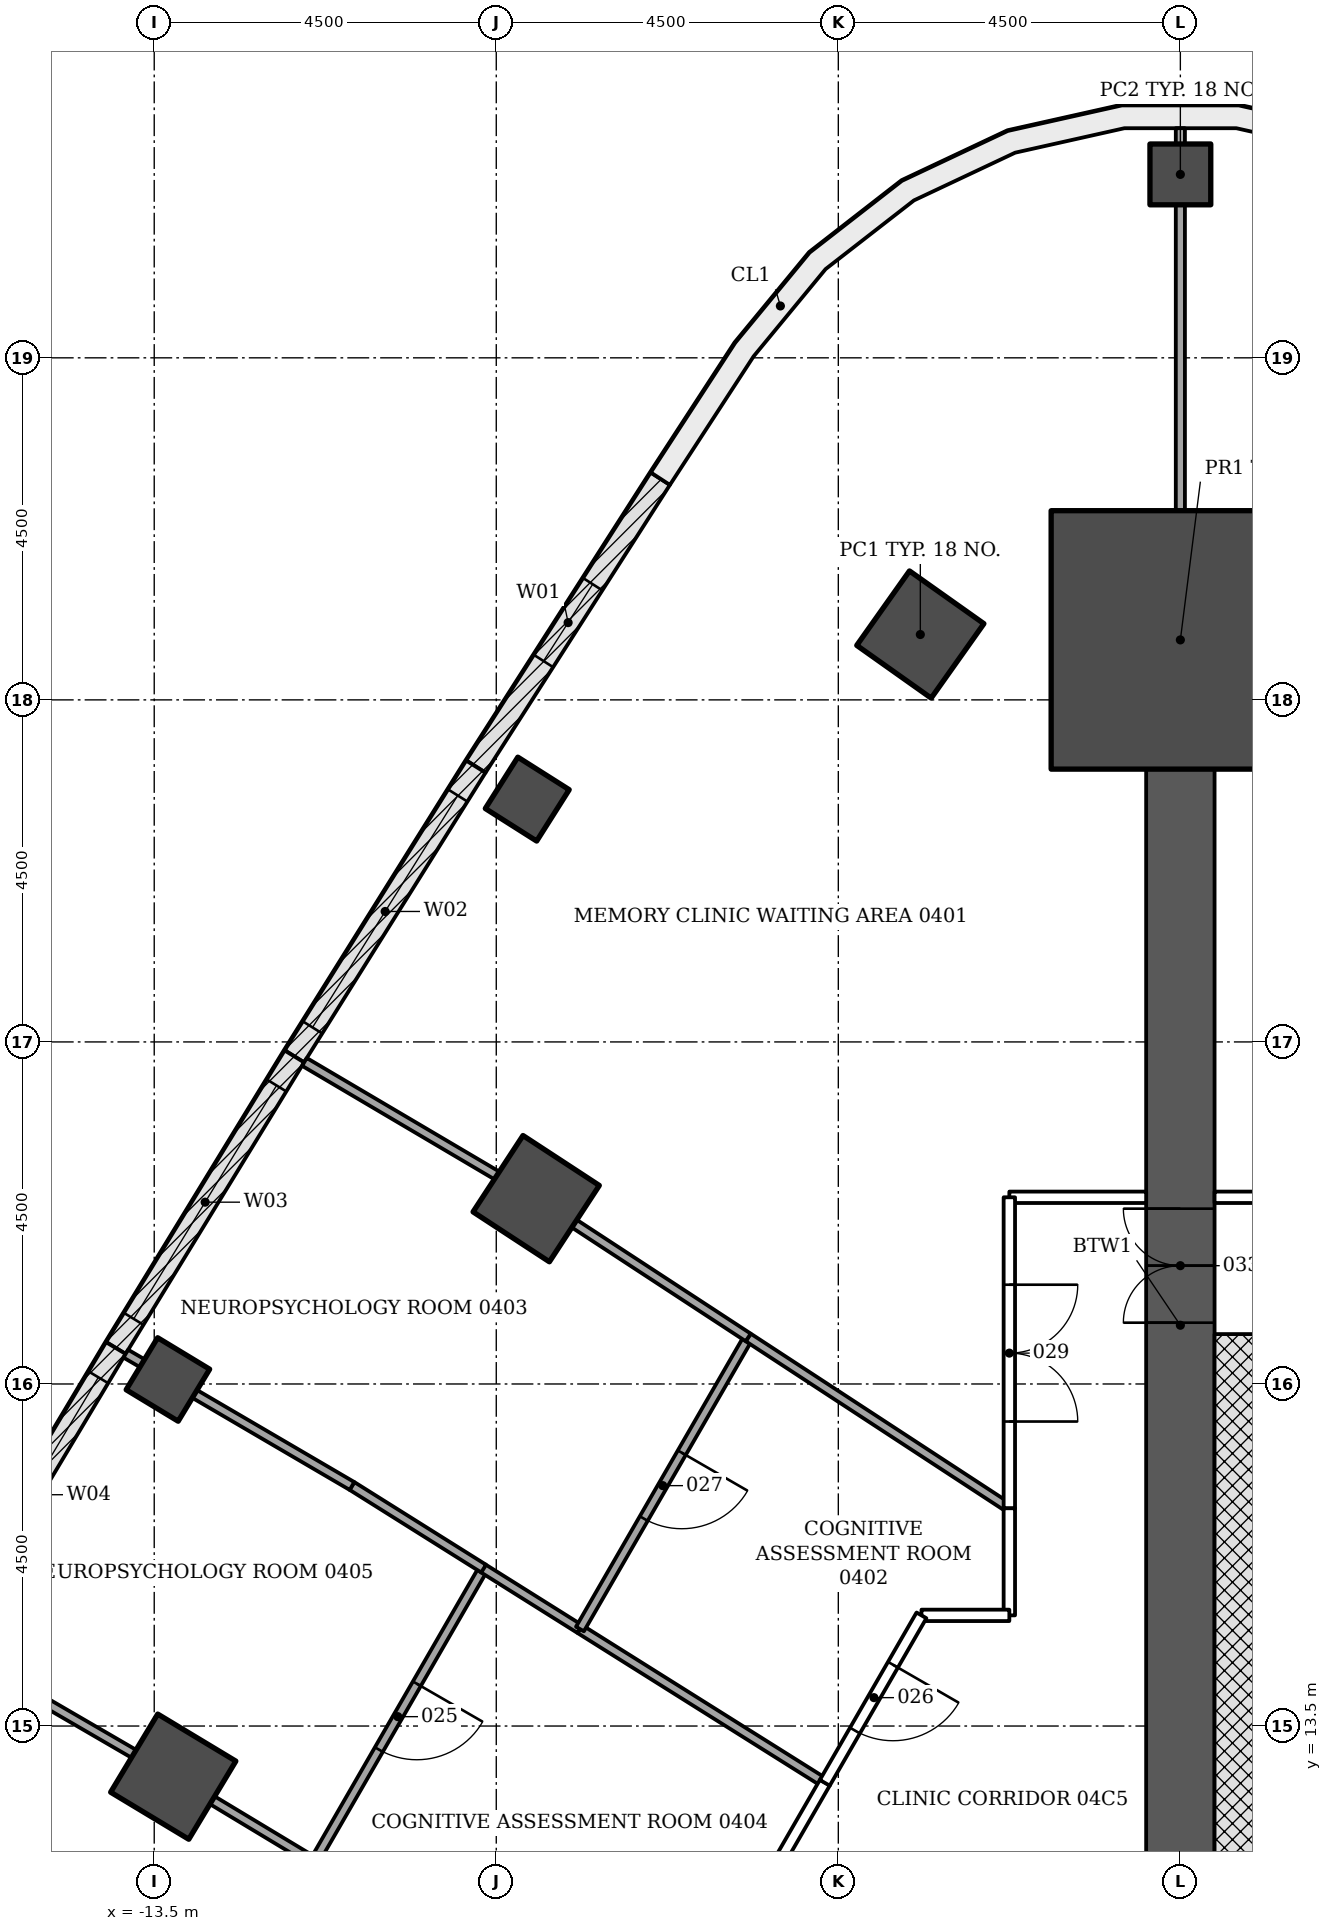
"""IFC4 building model, lengths in metres.
Left out: names, types, materials, properties, quantities, classifications, styles, units other than length and angle.
Written with IfcOpenShell. Run it as: python <this file> out.ifc"""

import sys

from ifc_helpers import new_model, si_unit, direction, frame, frame_2d, origin, origin_2d, place, context, subcontext, project, spatial, polyline, rectangle, outline, extrude, element, fill, save


model = new_model("IFC4")
c1 = context("Model", 3, precision=1e-05, world=origin(), true_north=direction((0.0, 1.0)))
c2 = subcontext(c1, "Body", "Model", "MODEL_VIEW")
j1 = project(units=[si_unit("LENGTHUNIT", "METRE"), si_unit("PLANEANGLEUNIT", "RADIAN")], contexts=[c1])
p1 = place(None, origin())
s1 = spatial("IfcSite", under=j1, at=p1, CompositionType="ELEMENT")
p2 = place(p1, origin())
s2 = spatial("IfcBuilding", under=s1, at=p2, CompositionType="ELEMENT")
p3 = place(p2, frame((0.0, 0.0, 19.5)))
s3 = spatial("IfcBuildingStorey", under=s2, at=p3, CompositionType="ELEMENT", Elevation=19.5)
for number, where, z_axis, x_axis in (
    (1, (-3.421, 27.86, -0.25), (0.0, 0.0, 1.0), (-0.816, 0.578, 0.0)),
    (2, (-8.475, 20.438, -0.25), (0.0, 0.0, 1.0), (-0.837, 0.547, 0.0)),
    (3, (-13.25, 12.834, -0.25), (0.0, 0.0, 1.0), (-0.857, 0.516, 0.0)),
):
    element("IfcColumn", number, at=place(p3, frame(where, z_axis=z_axis, x_axis=x_axis)), inside=s3, PredefinedType="COLUMN", context=c2, shape_type="SweptSolid", body=[
        extrude(rectangle(XDim=1.2, YDim=1.2, at=origin_2d()), origin(), (0.0, 0.0, 1.0), 4.55),
    ])
for number, where, z_axis, x_axis in (
    (4, (0.0, 33.913, -0.25), (0.0, 0.0, 1.0), (0.0, 1.0, 0.0)),
    (5, (-8.592, 25.695, -0.25), (0.0, 0.0, 1.0), (-0.845, 0.535, 0.0)),
    (6, (-13.32, 18.059, -0.25), (0.0, 0.0, 1.0), (-0.856, 0.518, 0.0)),
):
    element("IfcColumn", number, at=place(p3, frame(where, z_axis=z_axis, x_axis=x_axis)), inside=s3, PredefinedType="COLUMN", context=c2, shape_type="SweptSolid", body=[
        extrude(rectangle(XDim=0.8, YDim=0.8, at=origin_2d()), origin(), (0.0, 0.0, 1.0), 4.55),
    ])
p4 = place(p3, frame((0.0, 11.456, -0.25), z_axis=(0.0, 0.0, 1.0), x_axis=(0.0, 1.0, 0.0)))
e7 = element("IfcWall", 7, at=p4, inside=s3, PredefinedType="SHEAR", context=c2, shape_type="SweptSolid", body=[
    extrude(rectangle(XDim=14.633, YDim=0.9, at=frame_2d((7.316, 0.0))), origin(), (0.0, 0.0, 1.0), 4.55),
])
p5 = place(p4, frame((7.35, 0.0, 0.25)))
e8 = element("IfcOpeningElement", 8, at=p5, cuts=e7, PredefinedType="OPENING", context=c2, shape_type="SweptSolid", body=[
    extrude(rectangle(XDim=1.5, YDim=2.1, at=frame_2d((0.75, 1.05))), frame((0.0, 0.46, 0.0), z_axis=(0.0, -1.0, 0.0), x_axis=(1.0, 0.0, 0.0)), (0.0, 0.0, 1.0), 0.92),
])
p6 = place(p3, frame((0.0, 27.789, -0.25), z_axis=(0.0, 0.0, 1.0), x_axis=(0.0, 1.0, 0.0)))
e9 = element("IfcColumn", 9, at=p6, inside=s3, PredefinedType="COLUMN", context=c2, shape_type="SweptSolid", body=[
    extrude(rectangle(XDim=3.4, YDim=3.4, at=origin_2d()), origin(), (0.0, 0.0, 1.0), 4.55),
])
p7 = place(p3, frame((-9.268, 26.124, 0.0), z_axis=(0.0, 0.0, 1.0), x_axis=(0.539483537275, 0.841996147859, 0.0)))
e10 = element("IfcWall", 10, at=p7, inside=s3, PredefinedType="NOTDEFINED", context=c2, shape_type="SweptSolid", body=[
    extrude(rectangle(XDim=4.496, YDim=0.3, at=frame_2d((2.248, 0.0))), origin(), (0.0, 0.0, 1.0), 4.3),
])
p8 = place(p7, frame((1.648, 0.0, 0.8)))
e11 = element("IfcOpeningElement", 11, at=p8, cuts=e10, PredefinedType="OPENING", context=c2, shape_type="SweptSolid", body=[
    extrude(rectangle(XDim=1.2, YDim=3.0, at=frame_2d((0.6, 1.5))), frame((0.0, 0.16, 0.0), z_axis=(0.0, -1.0, 0.0), x_axis=(1.0, 0.0, 0.0)), (0.0, 0.0, 1.0), 0.32),
])
p9 = place(p3, frame((-11.655, 22.311, 0.0), z_axis=(0.0, 0.0, 1.0), x_axis=(0.530804082031, 0.847494558389, 0.0)))
e12 = element("IfcWall", 12, at=p9, inside=s3, PredefinedType="NOTDEFINED", context=c2, shape_type="SweptSolid", body=[
    extrude(rectangle(XDim=4.496, YDim=0.3, at=frame_2d((2.248, 0.0))), origin(), (0.0, 0.0, 1.0), 4.3),
])
p10 = place(p9, frame((0.448, 0.0, 1.5)))
e13 = element("IfcOpeningElement", 13, at=p10, cuts=e12, PredefinedType="OPENING", context=c2, shape_type="SweptSolid", body=[
    extrude(rectangle(XDim=3.6, YDim=1.8, at=frame_2d((1.8, 0.9))), frame((0.0, 0.16, 0.0), z_axis=(0.0, -1.0, 0.0), x_axis=(1.0, 0.0, 0.0)), (0.0, 0.0, 1.0), 0.32),
])
p11 = place(p3, frame((-14.004, 18.475, 0.0), z_axis=(0.0, 0.0, 1.0), x_axis=(0.522078085402, 0.852897691838, 0.0)))
e14 = element("IfcWall", 14, at=p11, inside=s3, PredefinedType="NOTDEFINED", context=c2, shape_type="SweptSolid", body=[
    extrude(rectangle(XDim=4.496, YDim=0.3, at=frame_2d((2.248, 0.0))), origin(), (0.0, 0.0, 1.0), 4.3),
])
p12 = place(p11, frame((0.448, 0.0, 1.5)))
e15 = element("IfcOpeningElement", 15, at=p12, cuts=e14, PredefinedType="OPENING", context=c2, shape_type="SweptSolid", body=[
    extrude(rectangle(XDim=3.6, YDim=1.8, at=frame_2d((1.8, 0.9))), frame((0.0, 0.16, 0.0), z_axis=(0.0, -1.0, 0.0), x_axis=(1.0, 0.0, 0.0)), (0.0, 0.0, 1.0), 0.32),
])
p13 = place(p3, frame((-16.313, 14.614, 0.0), z_axis=(0.0, 0.0, 1.0), x_axis=(0.513257465408, 0.858234684805, 0.0)))
e16 = element("IfcWall", 16, at=p13, inside=s3, PredefinedType="NOTDEFINED", context=c2, shape_type="SweptSolid", body=[
    extrude(rectangle(XDim=4.496, YDim=0.3, at=frame_2d((2.248, 0.0))), origin(), (0.0, 0.0, 1.0), 4.3),
])
p14 = place(p13, frame((0.448, 0.0, 1.5)))
e17 = element("IfcOpeningElement", 17, at=p14, cuts=e16, PredefinedType="OPENING", context=c2, shape_type="SweptSolid", body=[
    extrude(rectangle(XDim=3.6, YDim=1.8, at=frame_2d((1.8, 0.9))), frame((0.0, 0.16, 0.0), z_axis=(0.0, -1.0, 0.0), x_axis=(1.0, 0.0, 0.0)), (0.0, 0.0, 1.0), 0.32),
])
p15 = place(p3, origin())
e18 = element("IfcWall", 18, at=p15, inside=s3, PredefinedType="NOTDEFINED", context=c2, shape_type="SweptSolid", body=[
    extrude(outline(polyline([(6.967, 29.992), (5.857, 31.697), (4.878, 32.884), (3.663, 33.828), (2.271, 34.485), (0.769, 34.821), (-0.769, 34.821), (-2.271, 34.485), (-3.663, 33.828), (-4.878, 32.884), (-5.857, 31.697), (-6.967, 29.992), (-6.716, 29.828), (-5.615, 31.519), (-4.667, 32.667), (-3.505, 33.571), (-2.173, 34.199), (-0.736, 34.521), (0.736, 34.521), (2.173, 34.199), (3.505, 33.571), (4.667, 32.667), (5.615, 31.519), (6.716, 29.828), (6.967, 29.992)])), origin(), (0.0, 0.0, 1.0), 4.3),
])
p16 = place(p3, frame((1.018, 11.456, -0.25), z_axis=(0.0, 0.0, 1.0), x_axis=(0.0, 1.0, 0.0)))
e19 = element("IfcWall", 19, at=p16, inside=s3, PredefinedType="SHEAR", context=c2, shape_type="SweptSolid", body=[
    extrude(rectangle(XDim=7.2, YDim=1.136, at=frame_2d((3.6, 0.0))), origin(), (0.0, 0.0, 1.0), 4.55),
])
p17 = place(p3, frame((7.136, 20.456, 0.0), z_axis=(0.0, 0.0, 1.0), x_axis=(-1.0, 0.0, 0.0)))
e20 = element("IfcWall", 20, at=p17, inside=s3, PredefinedType="PARTITIONING", context=c2, shape_type="SweptSolid", body=[
    extrude(rectangle(XDim=6.686, YDim=0.15, at=frame_2d((3.343, 0.0))), origin(), (0.0, 0.0, 1.0), 3.843),
])
p18 = place(p17, frame((2.45, 0.0, 0.0)))
e21 = element("IfcOpeningElement", 21, at=p18, cuts=e20, PredefinedType="OPENING", context=c2, shape_type="SweptSolid", body=[
    extrude(rectangle(XDim=1.8, YDim=2.1, at=frame_2d((0.9, 1.05))), frame((0.0, 0.085, 0.0), z_axis=(0.0, -1.0, 0.0), x_axis=(1.0, 0.0, 0.0)), (0.0, 0.0, 1.0), 0.17),
])
p19 = place(p3, frame((-13.769, 13.135, 0.0), z_axis=(0.0, 0.0, 1.0), x_axis=(-0.864576979504, 0.50250039454, 0.0)))
e22 = element("IfcWall", 22, at=p19, inside=s3, PredefinedType="PARTITIONING", context=c2, shape_type="SweptSolid", body=[
    extrude(rectangle(XDim=2.792, YDim=0.12, at=frame_2d((1.396, 0.0))), origin(), (0.0, 0.0, 1.0), 3.683),
])
p20 = place(p3, frame((-11.397, 11.717, 0.0), z_axis=(0.0, 0.0, 1.0), x_axis=(-0.85652691333, 0.516102360721, 0.0)))
e23 = element("IfcWall", 23, at=p20, inside=s3, PredefinedType="PARTITIONING", context=c2, shape_type="SweptSolid", body=[
    extrude(rectangle(XDim=1.563, YDim=0.12, at=frame_2d((0.782, 0.0))), origin(), (0.0, 0.0, 1.0), 3.698),
])
p21 = place(p3, frame((-6.858, 8.979, 0.0), z_axis=(0.0, 0.0, 1.0), x_axis=(0.500105111742, 0.865964708986, 0.0)))
e24 = element("IfcWall", 24, at=p21, inside=s3, PredefinedType="PARTITIONING", context=c2, shape_type="SweptSolid", body=[
    extrude(rectangle(XDim=4.363, YDim=0.15, at=frame_2d((2.181, 0.0))), origin(), (0.0, 0.0, 1.0), 3.698),
])
p22 = place(p21, frame((1.65, 0.0, 0.0)))
e25 = element("IfcOpeningElement", 25, at=p22, cuts=e24, PredefinedType="OPENING", context=c2, shape_type="SweptSolid", body=[
    extrude(rectangle(XDim=1.0, YDim=2.1, at=frame_2d((0.5, 1.05))), frame((0.0, 0.085, 0.0), z_axis=(0.0, -1.0, 0.0), x_axis=(1.0, 0.0, 0.0)), (0.0, 0.0, 1.0), 0.17),
])
p23 = place(p3, frame((-9.17, 15.572, 0.0), z_axis=(0.0, 0.0, 1.0), x_axis=(-0.499902881486, -0.866081467924, 0.0)))
e26 = element("IfcWall", 26, at=p23, inside=s3, PredefinedType="PARTITIONING", context=c2, shape_type="SweptSolid", body=[
    extrude(rectangle(XDim=4.451, YDim=0.12, at=frame_2d((2.226, 0.0))), origin(), (0.0, 0.0, 1.0), 3.698),
])
p24 = place(p23, frame((1.75, 0.0, 0.0)))
e27 = element("IfcOpeningElement", 27, at=p24, cuts=e26, PredefinedType="OPENING", context=c2, shape_type="SweptSolid", body=[
    extrude(rectangle(XDim=1.0, YDim=2.1, at=frame_2d((0.5, 1.05))), frame((0.0, 0.07, 0.0), z_axis=(0.0, -1.0, 0.0), x_axis=(1.0, 0.0, 0.0)), (0.0, 0.0, 1.0), 0.14),
])
p25 = place(p3, frame((-4.68, 12.753, 0.0), z_axis=(0.0, 0.0, 1.0), x_axis=(-0.846844902979, 0.531839929206, 0.0)))
e28 = element("IfcWall", 28, at=p25, inside=s3, PredefinedType="PARTITIONING", context=c2, shape_type="SweptSolid", body=[
    extrude(rectangle(XDim=3.8, YDim=0.12, at=frame_2d((1.9, 0.0))), origin(), (0.0, 0.0, 1.0), 3.698),
])
p26 = place(p3, frame((-7.901, 14.776, 0.0), z_axis=(0.0, 0.0, 1.0), x_axis=(-0.847002237732, 0.531589323892, 0.0)))
e29 = element("IfcWall", 29, at=p26, inside=s3, PredefinedType="PARTITIONING", context=c2, shape_type="SweptSolid", body=[
    extrude(rectangle(XDim=1.503, YDim=0.12, at=frame_2d((0.751, 0.0))), origin(), (0.0, 0.0, 1.0), 3.698),
])
p27 = place(p3, frame((-2.25, 16.365, 0.0), z_axis=(0.0, 0.0, 1.0), x_axis=(0.0, -1.0, 0.0)))
e30 = element("IfcWall", 30, at=p27, inside=s3, PredefinedType="PARTITIONING", context=c2, shape_type="SweptSolid", body=[
    extrude(rectangle(XDim=1.409, YDim=0.15, at=frame_2d((0.705, 0.0))), origin(), (0.0, 0.0, 1.0), 3.767),
])
p28 = place(p3, frame((-2.25, 14.956, 0.0), z_axis=(0.0, 0.0, 1.0), x_axis=(-1.0, 0.0, 0.0)))
e31 = element("IfcWall", 31, at=p28, inside=s3, PredefinedType="PARTITIONING", context=c2, shape_type="SweptSolid", body=[
    extrude(rectangle(XDim=1.156, YDim=0.15, at=frame_2d((0.578, 0.0))), origin(), (0.0, 0.0, 1.0), 4.3),
])
p29 = place(p3, frame((-3.406, 14.956, 0.0), z_axis=(0.0, 0.0, 1.0), x_axis=(-0.499999364504, -0.866025770688, 0.0)))
e32 = element("IfcWall", 32, at=p29, inside=s3, PredefinedType="PARTITIONING", context=c2, shape_type="SweptSolid", body=[
    extrude(rectangle(XDim=2.544, YDim=0.15, at=frame_2d((1.272, 0.0))), origin(), (0.0, 0.0, 1.0), 3.698),
])
p30 = place(p29, frame((0.75, 0.0, 0.0)))
e33 = element("IfcOpeningElement", 33, at=p30, cuts=e32, PredefinedType="OPENING", context=c2, shape_type="SweptSolid", body=[
    extrude(rectangle(XDim=1.0, YDim=2.1, at=frame_2d((0.5, 1.05))), frame((0.0, 0.085, 0.0), z_axis=(0.0, -1.0, 0.0), x_axis=(1.0, 0.0, 0.0)), (0.0, 0.0, 1.0), 0.17),
])
p31 = place(p3, frame((-0.45, 20.456, 0.0), z_axis=(0.0, 0.0, 1.0), x_axis=(-1.0, 0.0, 0.0)))
e34 = element("IfcWall", 34, at=p31, inside=s3, PredefinedType="PARTITIONING", context=c2, shape_type="SweptSolid", body=[
    extrude(rectangle(XDim=1.8, YDim=0.15, at=frame_2d((0.9, 0.0))), origin(), (0.0, 0.0, 1.0), 3.843),
])
p32 = place(p3, frame((-2.25, 20.456, 0.0), z_axis=(0.0, 0.0, 1.0), x_axis=(0.0, -1.0, 0.0)))
e35 = element("IfcWall", 35, at=p32, inside=s3, PredefinedType="PARTITIONING", context=c2, shape_type="SweptSolid", body=[
    extrude(rectangle(XDim=4.089, YDim=0.15, at=frame_2d((2.044, 0.0))), origin(), (0.0, 0.0, 1.0), 3.767),
])
p33 = place(p32, frame((1.15, 0.0, 0.0)))
e36 = element("IfcOpeningElement", 36, at=p33, cuts=e35, PredefinedType="OPENING", context=c2, shape_type="SweptSolid", body=[
    extrude(rectangle(XDim=1.8, YDim=2.1, at=frame_2d((0.9, 1.05))), frame((0.0, 0.085, 0.0), z_axis=(0.0, -1.0, 0.0), x_axis=(1.0, 0.0, 0.0)), (0.0, 0.0, 1.0), 0.17),
])
p34 = place(p3, frame((-13.658, 18.273, 0.0), z_axis=(0.0, 0.0, 1.0), x_axis=(-0.863885093979, 0.503688936151, 0.0)))
e37 = element("IfcWall", 37, at=p34, inside=s3, PredefinedType="PARTITIONING", context=c2, shape_type="SweptSolid", body=[
    extrude(rectangle(XDim=0.25, YDim=0.12, at=frame_2d((0.125, 0.0))), origin(), (0.0, 0.0, 1.0), 4.3),
])
p35 = place(p3, frame((-9.166, 15.571, 0.0), z_axis=(0.0, 0.0, 1.0), x_axis=(-0.84701751501, 0.531564981227, 0.0)))
e38 = element("IfcWall", 38, at=p35, inside=s3, PredefinedType="PARTITIONING", context=c2, shape_type="SweptSolid", body=[
    extrude(rectangle(XDim=2.045, YDim=0.12, at=frame_2d((1.022, 0.0))), origin(), (0.0, 0.0, 1.0), 3.18),
])
p36 = place(p3, frame((-10.898, 16.658, 0.0), z_axis=(0.0, 0.0, 1.0), x_axis=(-0.863161652457, 0.504927679701, 0.0)))
e39 = element("IfcWall", 39, at=p36, inside=s3, PredefinedType="PARTITIONING", context=c2, shape_type="SweptSolid", body=[
    extrude(rectangle(XDim=2.398, YDim=0.12, at=frame_2d((1.199, 0.0))), origin(), (0.0, 0.0, 1.0), 3.18),
])
p37 = place(p3, frame((-5.684, 18.611, 0.0), z_axis=(0.0, 0.0, 1.0), x_axis=(-0.500099413844, -0.865967999567, 0.0)))
e40 = element("IfcWall", 40, at=p37, inside=s3, PredefinedType="PARTITIONING", context=c2, shape_type="SweptSolid", body=[
    extrude(rectangle(XDim=4.429, YDim=0.12, at=frame_2d((2.214, 0.0))), origin(), (0.0, 0.0, 1.0), 3.698),
])
p38 = place(p37, frame((1.75, 0.0, 0.0)))
e41 = element("IfcOpeningElement", 41, at=p38, cuts=e40, PredefinedType="OPENING", context=c2, shape_type="SweptSolid", body=[
    extrude(rectangle(XDim=1.0, YDim=2.1, at=frame_2d((0.5, 1.05))), frame((0.0, 0.07, 0.0), z_axis=(0.0, -1.0, 0.0), x_axis=(1.0, 0.0, 0.0)), (0.0, 0.0, 1.0), 0.14),
])
p39 = place(p3, frame((-2.252, 16.367, 0.0), z_axis=(0.0, 0.0, 1.0), x_axis=(-0.836925574982, 0.547316710819, 0.0)))
e42 = element("IfcWall", 42, at=p39, inside=s3, PredefinedType="PARTITIONING", context=c2, shape_type="SweptSolid", body=[
    extrude(rectangle(XDim=4.102, YDim=0.12, at=frame_2d((2.051, 0.0))), origin(), (0.0, 0.0, 1.0), 3.767),
])
p40 = place(p3, frame((-8.992, 20.743, 0.0), z_axis=(0.0, 0.0, 1.0), x_axis=(-0.861228913487, 0.508217235613, 0.0)))
e43 = element("IfcWall", 43, at=p40, inside=s3, PredefinedType="PARTITIONING", context=c2, shape_type="SweptSolid", body=[
    extrude(rectangle(XDim=2.94, YDim=0.12, at=frame_2d((1.47, 0.0))), origin(), (0.0, 0.0, 1.0), 3.683),
])
p41 = place(p3, frame((-5.685, 18.612, 0.0), z_axis=(0.0, 0.0, 1.0), x_axis=(-0.836813840242, 0.547487531163, 0.0)))
e44 = element("IfcWall", 44, at=p41, inside=s3, PredefinedType="PARTITIONING", context=c2, shape_type="SweptSolid", body=[
    extrude(rectangle(XDim=2.734, YDim=0.12, at=frame_2d((1.367, 0.0))), origin(), (0.0, 0.0, 1.0), 3.767),
])
p42 = place(p3, frame((0.0, 29.489, 0.0), z_axis=(0.0, 0.0, 1.0), x_axis=(0.0, 1.0, 0.0)))
e45 = element("IfcWall", 45, at=p42, inside=s3, PredefinedType="PARTITIONING", context=c2, shape_type="SweptSolid", body=[
    extrude(rectangle(XDim=4.024, YDim=0.12, at=frame_2d((2.012, 0.0))), origin(), (0.0, 0.0, 1.0), 3.767),
])
p43 = place(p3, frame((0.0, 34.313, 0.0), z_axis=(0.0, 0.0, 1.0), x_axis=(0.0, 1.0, 0.0)))
e46 = element("IfcWall", 46, at=p43, inside=s3, PredefinedType="PARTITIONING", context=c2, shape_type="SweptSolid", body=[
    extrude(rectangle(XDim=0.208, YDim=0.12, at=frame_2d((0.104, 0.0))), origin(), (0.0, 0.0, 1.0), 4.3),
])
p44 = place(p8, origin())
e47 = element("IfcWindow", 47, at=p44, inside=s3, PartitioningType="SINGLE_PANEL", PredefinedType="WINDOW", context=c2, shape_type="SweptSolid", body=[
    extrude(rectangle(XDim=1.2, YDim=3.0, at=frame_2d((0.6, 1.5))), frame((0.0, 0.03, 0.0), z_axis=(0.0, -1.0, 0.0), x_axis=(1.0, 0.0, 0.0)), (0.0, 0.0, 1.0), 0.06),
])
fill(e11, e47)
p45 = place(p10, origin())
e48 = element("IfcWindow", 48, at=p45, inside=s3, PartitioningType="SINGLE_PANEL", PredefinedType="WINDOW", context=c2, shape_type="SweptSolid", body=[
    extrude(rectangle(XDim=3.6, YDim=1.8, at=frame_2d((1.8, 0.9))), frame((0.0, 0.03, 0.0), z_axis=(0.0, -1.0, 0.0), x_axis=(1.0, 0.0, 0.0)), (0.0, 0.0, 1.0), 0.06),
])
fill(e13, e48)
p46 = place(p12, origin())
e49 = element("IfcWindow", 49, at=p46, inside=s3, PartitioningType="SINGLE_PANEL", PredefinedType="WINDOW", context=c2, shape_type="SweptSolid", body=[
    extrude(rectangle(XDim=3.6, YDim=1.8, at=frame_2d((1.8, 0.9))), frame((0.0, 0.03, 0.0), z_axis=(0.0, -1.0, 0.0), x_axis=(1.0, 0.0, 0.0)), (0.0, 0.0, 1.0), 0.06),
])
fill(e15, e49)
p47 = place(p14, origin())
e50 = element("IfcWindow", 50, at=p47, inside=s3, PartitioningType="SINGLE_PANEL", PredefinedType="WINDOW", context=c2, shape_type="SweptSolid", body=[
    extrude(rectangle(XDim=3.6, YDim=1.8, at=frame_2d((1.8, 0.9))), frame((0.0, 0.03, 0.0), z_axis=(0.0, -1.0, 0.0), x_axis=(1.0, 0.0, 0.0)), (0.0, 0.0, 1.0), 0.06),
])
fill(e17, e50)
p48 = place(p24, origin())
e51 = element("IfcDoor", 51, at=p48, inside=s3, OperationType="SINGLE_SWING_LEFT", PredefinedType="DOOR", context=c2, shape_type="SweptSolid", body=[
    extrude(rectangle(XDim=1.0, YDim=2.1, at=frame_2d((0.5, 1.05))), frame((0.0, 0.025, 0.0), z_axis=(0.0, -1.0, 0.0), x_axis=(1.0, 0.0, 0.0)), (0.0, 0.0, 1.0), 0.05),
])
fill(e27, e51)
p49 = place(p30, origin())
e52 = element("IfcDoor", 52, at=p49, inside=s3, OperationType="SINGLE_SWING_RIGHT", PredefinedType="DOOR", context=c2, shape_type="SweptSolid", body=[
    extrude(rectangle(XDim=1.0, YDim=2.1, at=frame_2d((0.5, 1.05))), frame((0.0, 0.025, 0.0), z_axis=(0.0, -1.0, 0.0), x_axis=(1.0, 0.0, 0.0)), (0.0, 0.0, 1.0), 0.05),
])
fill(e33, e52)
p50 = place(p38, origin())
e53 = element("IfcDoor", 53, at=p50, inside=s3, OperationType="SINGLE_SWING_LEFT", PredefinedType="DOOR", context=c2, shape_type="SweptSolid", body=[
    extrude(rectangle(XDim=1.0, YDim=2.1, at=frame_2d((0.5, 1.05))), frame((0.0, 0.025, 0.0), z_axis=(0.0, -1.0, 0.0), x_axis=(1.0, 0.0, 0.0)), (0.0, 0.0, 1.0), 0.05),
])
fill(e41, e53)
p51 = place(p33, origin())
e54 = element("IfcDoor", 54, at=p51, inside=s3, OperationType="DOUBLE_DOOR_SINGLE_SWING", PredefinedType="DOOR", context=c2, shape_type="SweptSolid", body=[
    extrude(rectangle(XDim=1.8, YDim=2.1, at=frame_2d((0.9, 1.05))), frame((0.0, 0.025, 0.0), z_axis=(0.0, -1.0, 0.0), x_axis=(1.0, 0.0, 0.0)), (0.0, 0.0, 1.0), 0.05),
])
fill(e36, e54)
p52 = place(p5, origin())
e55 = element("IfcDoor", 55, at=p52, inside=s3, OperationType="DOUBLE_DOOR_SINGLE_SWING", PredefinedType="DOOR", context=c2, shape_type="SweptSolid", body=[
    extrude(rectangle(XDim=1.5, YDim=2.1, at=frame_2d((0.75, 1.05))), frame((0.0, 0.025, 0.0), z_axis=(0.0, -1.0, 0.0), x_axis=(1.0, 0.0, 0.0)), (0.0, 0.0, 1.0), 0.05),
])
fill(e8, e55)
save(model, sys.argv[1])
